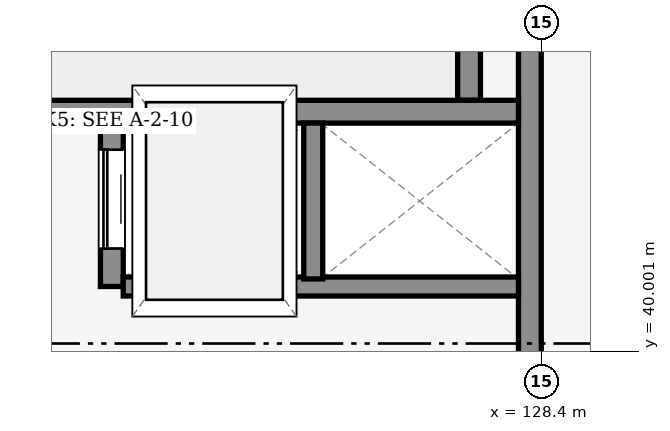
"""IFC4 building model, lengths in metres.
Left out: names, types, materials, properties, quantities, classifications, styles, units other than length and angle.
Written with IfcOpenShell. Run it as: python <this file> out.ifc"""

import sys

from ifc_helpers import new_model, si_unit, direction, frame, frame_2d, origin, place, context, subcontext, project, spatial, rectangle, extrude, element, fill, save


model = new_model("IFC4")
c1 = context("Model", 3, precision=1e-05, world=origin(), true_north=direction((0.0, 1.0)))
c2 = subcontext(c1, "Body", "Model", "MODEL_VIEW")
j1 = project(units=[si_unit("LENGTHUNIT", "METRE"), si_unit("PLANEANGLEUNIT", "RADIAN")], contexts=[c1])
p1 = place(None, origin())
s1 = spatial("IfcSite", under=j1, at=p1, CompositionType="ELEMENT")
p2 = place(p1, origin())
s2 = spatial("IfcBuilding", under=s1, at=p2, CompositionType="ELEMENT")
p3 = place(p2, frame((0.0, 0.0, 5.4)))
s3 = spatial("IfcBuildingStorey", under=s2, at=p3, CompositionType="ELEMENT", Elevation=5.4)
p4 = place(p3, frame((128.25, 38.559, 0.0), z_axis=(0.0, 0.0, 1.0), x_axis=(0.0, 1.0, 0.0)))
e1 = element("IfcWall", 1, at=p4, inside=s3, PredefinedType="SHEAR", context=c2, shape_type="SweptSolid", body=[
    extrude(rectangle(XDim=8.083, YDim=0.3, at=frame_2d((4.042, 0.0))), origin(), (0.0, 0.0, 1.0), 3.38),
])
p5 = place(p3, frame((127.45, 43.3, 0.0), z_axis=(0.0, 0.0, 1.0), x_axis=(0.0, 1.0, 0.0)))
e2 = element("IfcWall", 2, at=p5, inside=s3, PredefinedType="SHEAR", context=c2, shape_type="SweptSolid", body=[
    extrude(rectangle(XDim=3.2, YDim=0.3, at=frame_2d((1.6, 0.0))), origin(), (0.0, 0.0, 1.0), 3.38),
])
p6 = place(p3, frame((116.7, 43.15, 0.0), z_axis=(0.0, 0.0, 1.0), x_axis=(1.0, 0.0, 0.0)))
e3 = element("IfcWall", 3, at=p6, inside=s3, PredefinedType="SHEAR", context=c2, shape_type="SweptSolid", body=[
    extrude(rectangle(XDim=11.4, YDim=0.3, at=frame_2d((5.7, 0.0))), origin(), (0.0, 0.0, 1.0), 3.38),
])
p7 = place(p6, frame((0.55, 0.0, 0.0)))
e4 = element("IfcOpeningElement", 4, at=p7, cuts=e3, PredefinedType="OPENING", context=c2, shape_type="SweptSolid", body=[
    extrude(rectangle(XDim=1.15, YDim=2.15, at=frame_2d((0.575, 1.075))), frame((0.0, 0.16, 0.0), z_axis=(0.0, -1.0, 0.0), x_axis=(1.0, 0.0, 0.0)), (0.0, 0.0, 1.0), 0.32),
])
p8 = place(p3, frame((122.75, 40.85, 0.0), z_axis=(0.0, 0.0, 1.0), x_axis=(0.0, 1.0, 0.0)))
e5 = element("IfcWall", 5, at=p8, inside=s3, PredefinedType="SHEAR", context=c2, shape_type="SweptSolid", body=[
    extrude(rectangle(XDim=2.15, YDim=0.3, at=frame_2d((1.075, 0.0))), origin(), (0.0, 0.0, 1.0), 3.38),
])
p9 = place(p8, frame((0.5, 0.0, 0.0)))
e6 = element("IfcOpeningElement", 6, at=p9, cuts=e5, PredefinedType="OPENING", context=c2, shape_type="SweptSolid", body=[
    extrude(rectangle(XDim=1.3, YDim=2.3, at=frame_2d((0.65, 1.15))), frame((0.0, 0.16, 0.0), z_axis=(0.0, -1.0, 0.0), x_axis=(1.0, 0.0, 0.0)), (0.0, 0.0, 1.0), 0.32),
])
p10 = place(p3, frame((122.9, 40.85, 0.0), z_axis=(0.0, 0.0, 1.0), x_axis=(1.0, 0.0, 0.0)))
e7 = element("IfcWall", 7, at=p10, inside=s3, PredefinedType="PARTITIONING", context=c2, shape_type="SweptSolid", body=[
    extrude(rectangle(XDim=5.2, YDim=0.25, at=frame_2d((2.6, 0.0))), origin(), (0.0, 0.0, 1.0), 2.525),
])
p11 = place(p3, frame((125.4, 40.95, 0.0), z_axis=(0.0, 0.0, 1.0), x_axis=(0.0, 1.0, 0.0)))
e8 = element("IfcWall", 8, at=p11, inside=s3, PredefinedType="PARTITIONING", context=c2, shape_type="SweptSolid", body=[
    extrude(rectangle(XDim=2.05, YDim=0.25, at=frame_2d((1.025, 0.0))), origin(), (0.0, 0.0, 1.0), 2.525),
])
p12 = place(p9, origin())
e9 = element("IfcDoor", 9, at=p12, inside=s3, OperationType="SLIDING_TO_LEFT", PredefinedType="DOOR", context=c2, shape_type="SweptSolid", body=[
    extrude(rectangle(XDim=1.3, YDim=2.3, at=frame_2d((0.65, 1.15))), frame((0.0, 0.025, 0.0), z_axis=(0.0, -1.0, 0.0), x_axis=(1.0, 0.0, 0.0)), (0.0, 0.0, 1.0), 0.05),
])
fill(e6, e9)
save(model, sys.argv[1])
